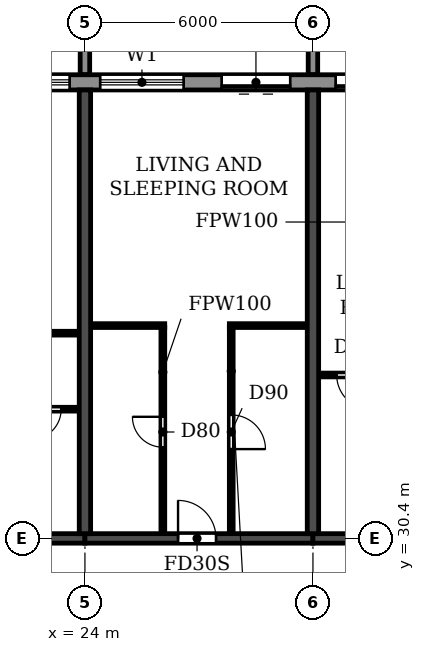
"""IFC4 building model, lengths in metres.
Left out: names, types, materials, properties, quantities, classifications, styles, units other than length and angle.
Written with IfcOpenShell. Run it as: python <this file> out.ifc"""

import sys

from ifc_helpers import new_model, si_unit, direction, frame, frame_2d, origin, place, context, subcontext, project, spatial, polyline, rectangle, outline, extrude, source, transform, mapped, element, fill, save


model = new_model("IFC4")
c1 = context("Model", 3, precision=1e-05, world=origin(), true_north=direction((0.0, 1.0)))
c2 = subcontext(c1, "Body", "Model", "MODEL_VIEW")
j1 = project(units=[si_unit("LENGTHUNIT", "METRE"), si_unit("PLANEANGLEUNIT", "RADIAN")], contexts=[c1])
p1 = place(None, origin())
s1 = spatial("IfcSite", under=j1, at=p1, CompositionType="ELEMENT")
p2 = place(p1, origin())
s2 = spatial("IfcBuilding", under=s1, at=p2, CompositionType="ELEMENT")
p3 = place(p2, frame((0.0, 0.0, 152.1)))
s3 = spatial("IfcBuildingStorey", under=s2, at=p3, CompositionType="ELEMENT", Elevation=152.1)
for number, where, z_axis, x_axis in (
    (1, (24.0, 30.525, 0.0), (0.0, 0.0, 1.0), (0.0, 1.0, 0.0)),
    (2, (30.0, 30.525, 0.0), (0.0, 0.0, 1.0), (0.0, 1.0, 0.0)),
):
    element("IfcWall", number, at=place(p3, frame(where, z_axis=z_axis, x_axis=x_axis)), inside=s3, PredefinedType="SHEAR", context=c2, shape_type="SweptSolid", body=[
        extrude(rectangle(XDim=11.675, YDim=0.3, at=frame_2d((5.837, 0.0))), origin(), (0.0, 0.0, 1.0), 3.07),
    ])
p4 = place(p3, frame((18.0, 30.4, 0.0), z_axis=(0.0, 0.0, 1.0), x_axis=(1.0, 0.0, 0.0)))
e3 = element("IfcWall", 3, at=p4, inside=s3, PredefinedType="SHEAR", context=c2, shape_type="SweptSolid", body=[
    extrude(rectangle(XDim=6.0, YDim=0.25, at=frame_2d((3.0, 0.0))), origin(), (0.0, 0.0, 1.0), 2.47),
])
p5 = place(p4, frame((2.55, 0.0, 0.0)))
e4 = element("IfcOpeningElement", 4, at=p5, cuts=e3, PredefinedType="OPENING", context=c2, shape_type="SweptSolid", body=[
    extrude(rectangle(XDim=1.0, YDim=2.1, at=frame_2d((0.5, 1.05))), frame((0.0, 0.135, 0.0), z_axis=(0.0, -1.0, 0.0), x_axis=(1.0, 0.0, 0.0)), (0.0, 0.0, 1.0), 0.27),
])
p6 = place(p3, frame((24.0, 30.4, 0.0), z_axis=(0.0, 0.0, 1.0), x_axis=(1.0, 0.0, 0.0)))
e5 = element("IfcWall", 5, at=p6, inside=s3, PredefinedType="SHEAR", context=c2, shape_type="SweptSolid", body=[
    extrude(rectangle(XDim=6.0, YDim=0.25, at=frame_2d((3.0, 0.0))), origin(), (0.0, 0.0, 1.0), 2.47),
])
p7 = place(p6, frame((2.45, 0.0, 0.0)))
e6 = element("IfcOpeningElement", 6, at=p7, cuts=e5, PredefinedType="OPENING", context=c2, shape_type="SweptSolid", body=[
    extrude(rectangle(XDim=1.0, YDim=2.1, at=frame_2d((0.5, 1.05))), frame((0.0, 0.135, 0.0), z_axis=(0.0, -1.0, 0.0), x_axis=(1.0, 0.0, 0.0)), (0.0, 0.0, 1.0), 0.27),
])
p8 = place(p3, frame((30.0, 30.4, 0.0), z_axis=(0.0, 0.0, 1.0), x_axis=(1.0, 0.0, 0.0)))
e7 = element("IfcWall", 7, at=p8, inside=s3, PredefinedType="SHEAR", context=c2, shape_type="SweptSolid", body=[
    extrude(rectangle(XDim=6.0, YDim=0.25, at=frame_2d((3.0, 0.0))), origin(), (0.0, 0.0, 1.0), 2.47),
])
p9 = place(p8, frame((2.55, 0.0, 0.0)))
e8 = element("IfcOpeningElement", 8, at=p9, cuts=e7, PredefinedType="OPENING", context=c2, shape_type="SweptSolid", body=[
    extrude(rectangle(XDim=1.0, YDim=2.1, at=frame_2d((0.5, 1.05))), frame((0.0, 0.135, 0.0), z_axis=(0.0, -1.0, 0.0), x_axis=(1.0, 0.0, 0.0)), (0.0, 0.0, 1.0), 0.27),
])
p10 = place(p3, frame((85.317, 42.4, 0.0), z_axis=(0.0, 0.0, 1.0), x_axis=(-1.0, 0.0, 0.0)))
e9 = element("IfcWall", 9, at=p10, inside=s3, PredefinedType="STANDARD", context=c2, shape_type="SweptSolid", body=[
    extrude(rectangle(XDim=68.634, YDim=0.4, at=frame_2d((34.317, 0.0))), origin(), (0.0, 0.0, 1.0), 3.07),
])
p11 = place(p10, frame((64.917, 0.0, 0.0)))
e10 = element("IfcOpeningElement", 10, at=p11, cuts=e9, PredefinedType="OPENING", context=c2, shape_type="SweptSolid", body=[
    extrude(rectangle(XDim=1.8, YDim=2.4, at=frame_2d((0.9, 1.2))), frame((0.0, 0.21, 0.0), z_axis=(0.0, -1.0, 0.0), x_axis=(1.0, 0.0, 0.0)), (0.0, 0.0, 1.0), 0.42),
])
p12 = place(p10, frame((61.717, 0.0, 0.9)))
e11 = element("IfcOpeningElement", 11, at=p12, cuts=e9, PredefinedType="OPENING", context=c2, shape_type="SweptSolid", body=[
    extrude(rectangle(XDim=2.2, YDim=1.5, at=frame_2d((1.1, 0.75))), frame((0.0, 0.21, 0.0), z_axis=(0.0, -1.0, 0.0), x_axis=(1.0, 0.0, 0.0)), (0.0, 0.0, 1.0), 0.42),
])
p13 = place(p10, frame((58.717, 0.0, 0.9)))
e12 = element("IfcOpeningElement", 12, at=p13, cuts=e9, PredefinedType="OPENING", context=c2, shape_type="SweptSolid", body=[
    extrude(rectangle(XDim=2.2, YDim=1.5, at=frame_2d((1.1, 0.75))), frame((0.0, 0.21, 0.0), z_axis=(0.0, -1.0, 0.0), x_axis=(1.0, 0.0, 0.0)), (0.0, 0.0, 1.0), 0.42),
])
p14 = place(p10, frame((55.917, 0.0, 0.0)))
e13 = element("IfcOpeningElement", 13, at=p14, cuts=e9, PredefinedType="OPENING", context=c2, shape_type="SweptSolid", body=[
    extrude(rectangle(XDim=1.8, YDim=2.4, at=frame_2d((0.9, 1.2))), frame((0.0, 0.21, 0.0), z_axis=(0.0, -1.0, 0.0), x_axis=(1.0, 0.0, 0.0)), (0.0, 0.0, 1.0), 0.42),
])
p15 = place(p10, frame((52.917, 0.0, 0.0)))
e14 = element("IfcOpeningElement", 14, at=p15, cuts=e9, PredefinedType="OPENING", context=c2, shape_type="SweptSolid", body=[
    extrude(rectangle(XDim=1.8, YDim=2.4, at=frame_2d((0.9, 1.2))), frame((0.0, 0.21, 0.0), z_axis=(0.0, -1.0, 0.0), x_axis=(1.0, 0.0, 0.0)), (0.0, 0.0, 1.0), 0.42),
])
p16 = place(p10, frame((49.717, 0.0, 0.9)))
e15 = element("IfcOpeningElement", 15, at=p16, cuts=e9, PredefinedType="OPENING", context=c2, shape_type="SweptSolid", body=[
    extrude(rectangle(XDim=2.2, YDim=1.5, at=frame_2d((1.1, 0.75))), frame((0.0, 0.21, 0.0), z_axis=(0.0, -1.0, 0.0), x_axis=(1.0, 0.0, 0.0)), (0.0, 0.0, 1.0), 0.42),
])
p17 = place(p10, frame((46.717, 0.0, 0.9)))
e16 = element("IfcOpeningElement", 16, at=p17, cuts=e9, PredefinedType="OPENING", context=c2, shape_type="SweptSolid", body=[
    extrude(rectangle(XDim=2.2, YDim=1.5, at=frame_2d((1.1, 0.75))), frame((0.0, 0.21, 0.0), z_axis=(0.0, -1.0, 0.0), x_axis=(1.0, 0.0, 0.0)), (0.0, 0.0, 1.0), 0.42),
])
p18 = place(p10, frame((43.717, 0.0, 0.9)))
e17 = element("IfcOpeningElement", 17, at=p18, cuts=e9, PredefinedType="OPENING", context=c2, shape_type="SweptSolid", body=[
    extrude(rectangle(XDim=2.2, YDim=1.5, at=frame_2d((1.1, 0.75))), frame((0.0, 0.21, 0.0), z_axis=(0.0, -1.0, 0.0), x_axis=(1.0, 0.0, 0.0)), (0.0, 0.0, 1.0), 0.42),
])
p19 = place(p10, frame((40.917, 0.0, 0.0)))
e18 = element("IfcOpeningElement", 18, at=p19, cuts=e9, PredefinedType="OPENING", context=c2, shape_type="SweptSolid", body=[
    extrude(rectangle(XDim=1.8, YDim=2.4, at=frame_2d((0.9, 1.2))), frame((0.0, 0.21, 0.0), z_axis=(0.0, -1.0, 0.0), x_axis=(1.0, 0.0, 0.0)), (0.0, 0.0, 1.0), 0.42),
])
p20 = place(p10, frame((37.717, 0.0, 0.9)))
e19 = element("IfcOpeningElement", 19, at=p20, cuts=e9, PredefinedType="OPENING", context=c2, shape_type="SweptSolid", body=[
    extrude(rectangle(XDim=2.2, YDim=1.5, at=frame_2d((1.1, 0.75))), frame((0.0, 0.21, 0.0), z_axis=(0.0, -1.0, 0.0), x_axis=(1.0, 0.0, 0.0)), (0.0, 0.0, 1.0), 0.42),
])
p21 = place(p10, frame((34.917, 0.0, 0.0)))
e20 = element("IfcOpeningElement", 20, at=p21, cuts=e9, PredefinedType="OPENING", context=c2, shape_type="SweptSolid", body=[
    extrude(rectangle(XDim=1.8, YDim=2.4, at=frame_2d((0.9, 1.2))), frame((0.0, 0.21, 0.0), z_axis=(0.0, -1.0, 0.0), x_axis=(1.0, 0.0, 0.0)), (0.0, 0.0, 1.0), 0.42),
])
p22 = place(p10, frame((31.717, 0.0, 0.9)))
e21 = element("IfcOpeningElement", 21, at=p22, cuts=e9, PredefinedType="OPENING", context=c2, shape_type="SweptSolid", body=[
    extrude(rectangle(XDim=2.2, YDim=1.5, at=frame_2d((1.1, 0.75))), frame((0.0, 0.21, 0.0), z_axis=(0.0, -1.0, 0.0), x_axis=(1.0, 0.0, 0.0)), (0.0, 0.0, 1.0), 0.42),
])
p23 = place(p10, frame((28.717, 0.0, 0.9)))
e22 = element("IfcOpeningElement", 22, at=p23, cuts=e9, PredefinedType="OPENING", context=c2, shape_type="SweptSolid", body=[
    extrude(rectangle(XDim=2.2, YDim=1.5, at=frame_2d((1.1, 0.75))), frame((0.0, 0.21, 0.0), z_axis=(0.0, -1.0, 0.0), x_axis=(1.0, 0.0, 0.0)), (0.0, 0.0, 1.0), 0.42),
])
p24 = place(p10, frame((25.717, 0.0, 0.9)))
e23 = element("IfcOpeningElement", 23, at=p24, cuts=e9, PredefinedType="OPENING", context=c2, shape_type="SweptSolid", body=[
    extrude(rectangle(XDim=2.2, YDim=1.5, at=frame_2d((1.1, 0.75))), frame((0.0, 0.21, 0.0), z_axis=(0.0, -1.0, 0.0), x_axis=(1.0, 0.0, 0.0)), (0.0, 0.0, 1.0), 0.42),
])
p25 = place(p10, frame((22.717, 0.0, 0.9)))
e24 = element("IfcOpeningElement", 24, at=p25, cuts=e9, PredefinedType="OPENING", context=c2, shape_type="SweptSolid", body=[
    extrude(rectangle(XDim=2.2, YDim=1.5, at=frame_2d((1.1, 0.75))), frame((0.0, 0.21, 0.0), z_axis=(0.0, -1.0, 0.0), x_axis=(1.0, 0.0, 0.0)), (0.0, 0.0, 1.0), 0.42),
])
p26 = place(p10, frame((19.917, 0.0, 0.0)))
e25 = element("IfcOpeningElement", 25, at=p26, cuts=e9, PredefinedType="OPENING", context=c2, shape_type="SweptSolid", body=[
    extrude(rectangle(XDim=1.8, YDim=2.4, at=frame_2d((0.9, 1.2))), frame((0.0, 0.21, 0.0), z_axis=(0.0, -1.0, 0.0), x_axis=(1.0, 0.0, 0.0)), (0.0, 0.0, 1.0), 0.42),
])
p27 = place(p10, frame((16.717, 0.0, 0.9)))
e26 = element("IfcOpeningElement", 26, at=p27, cuts=e9, PredefinedType="OPENING", context=c2, shape_type="SweptSolid", body=[
    extrude(rectangle(XDim=2.2, YDim=1.5, at=frame_2d((1.1, 0.75))), frame((0.0, 0.21, 0.0), z_axis=(0.0, -1.0, 0.0), x_axis=(1.0, 0.0, 0.0)), (0.0, 0.0, 1.0), 0.42),
])
p28 = place(p10, frame((13.717, 0.0, 0.9)))
e27 = element("IfcOpeningElement", 27, at=p28, cuts=e9, PredefinedType="OPENING", context=c2, shape_type="SweptSolid", body=[
    extrude(rectangle(XDim=2.2, YDim=1.5, at=frame_2d((1.1, 0.75))), frame((0.0, 0.21, 0.0), z_axis=(0.0, -1.0, 0.0), x_axis=(1.0, 0.0, 0.0)), (0.0, 0.0, 1.0), 0.42),
])
p29 = place(p10, frame((10.917, 0.0, 0.0)))
e28 = element("IfcOpeningElement", 28, at=p29, cuts=e9, PredefinedType="OPENING", context=c2, shape_type="SweptSolid", body=[
    extrude(rectangle(XDim=1.8, YDim=2.4, at=frame_2d((0.9, 1.2))), frame((0.0, 0.21, 0.0), z_axis=(0.0, -1.0, 0.0), x_axis=(1.0, 0.0, 0.0)), (0.0, 0.0, 1.0), 0.42),
])
p30 = place(p10, frame((7.717, 0.0, 0.9)))
e29 = element("IfcOpeningElement", 29, at=p30, cuts=e9, PredefinedType="OPENING", context=c2, shape_type="SweptSolid", body=[
    extrude(rectangle(XDim=2.2, YDim=1.5, at=frame_2d((1.1, 0.75))), frame((0.0, 0.21, 0.0), z_axis=(0.0, -1.0, 0.0), x_axis=(1.0, 0.0, 0.0)), (0.0, 0.0, 1.0), 0.42),
])
p31 = place(p10, frame((4.717, 0.0, 0.9)))
e30 = element("IfcOpeningElement", 30, at=p31, cuts=e9, PredefinedType="OPENING", context=c2, shape_type="SweptSolid", body=[
    extrude(rectangle(XDim=2.2, YDim=1.5, at=frame_2d((1.1, 0.75))), frame((0.0, 0.21, 0.0), z_axis=(0.0, -1.0, 0.0), x_axis=(1.0, 0.0, 0.0)), (0.0, 0.0, 1.0), 0.42),
])
p32 = place(p10, frame((1.917, 0.0, 0.0)))
e31 = element("IfcOpeningElement", 31, at=p32, cuts=e9, PredefinedType="OPENING", context=c2, shape_type="SweptSolid", body=[
    extrude(rectangle(XDim=1.8, YDim=2.4, at=frame_2d((0.9, 1.2))), frame((0.0, 0.21, 0.0), z_axis=(0.0, -1.0, 0.0), x_axis=(1.0, 0.0, 0.0)), (0.0, 0.0, 1.0), 0.42),
])
m1 = source(origin(), c2, "Body", "SweptSolid", [
    extrude(outline(polyline([(0.0, 0.0), (0.25, 0.0), (0.25, 3.1), (0.0, 3.1), (0.0, 0.0)])), origin(), (0.0, 0.0, 1.0), 3.1),
])
for number, where in (
    (32, (23.875, 42.6, 0.0)),
    (33, (29.875, 42.6, 0.0)),
):
    element("IfcWall", number, at=place(p3, frame(where)), inside=s3, PredefinedType="STANDARD", context=c2, shape_type="MappedRepresentation", body=[
        mapped(m1, transform((0.0, 0.0, 0.0))),
    ])
p33 = place(p3, frame((21.9, 33.8, 0.0), z_axis=(0.0, 0.0, 1.0), x_axis=(1.0, 0.0, 0.0)))
e34 = element("IfcWall", 34, at=p33, inside=s3, PredefinedType="PARTITIONING", context=c2, shape_type="SweptSolid", body=[
    extrude(rectangle(XDim=1.94, YDim=0.1, at=frame_2d((0.97, 0.0))), origin(), (0.0, 0.0, 1.0), 3.07),
])
p34 = place(p33, frame((0.675, 0.0, 0.0)))
e35 = element("IfcOpeningElement", 35, at=p34, cuts=e34, PredefinedType="OPENING", context=c2, shape_type="SweptSolid", body=[
    extrude(rectangle(XDim=0.8, YDim=2.1, at=frame_2d((0.4, 1.05))), frame((0.0, 0.06, 0.0), z_axis=(0.0, -1.0, 0.0), x_axis=(1.0, 0.0, 0.0)), (0.0, 0.0, 1.0), 0.12),
])
p35 = place(p3, frame((30.16, 34.7, 0.0), z_axis=(0.0, 0.0, 1.0), x_axis=(1.0, 0.0, 0.0)))
e36 = element("IfcWall", 36, at=p35, inside=s3, PredefinedType="PARTITIONING", context=c2, shape_type="SweptSolid", body=[
    extrude(rectangle(XDim=2.04, YDim=0.1, at=frame_2d((1.02, 0.0))), origin(), (0.0, 0.0, 1.0), 3.07),
])
p36 = place(p35, frame((0.465, 0.0, 0.0)))
e37 = element("IfcOpeningElement", 37, at=p36, cuts=e36, PredefinedType="OPENING", context=c2, shape_type="SweptSolid", body=[
    extrude(rectangle(XDim=0.9, YDim=2.1, at=frame_2d((0.45, 1.05))), frame((0.0, 0.06, 0.0), z_axis=(0.0, -1.0, 0.0), x_axis=(1.0, 0.0, 0.0)), (0.0, 0.0, 1.0), 0.12),
])
p37 = place(p3, frame((20.95, 35.8, 0.0), z_axis=(0.0, 0.0, 1.0), x_axis=(1.0, 0.0, 0.0)))
e38 = element("IfcWall", 38, at=p37, inside=s3, PredefinedType="PARTITIONING", context=c2, shape_type="SweptSolid", body=[
    extrude(rectangle(XDim=2.89, YDim=0.1, at=frame_2d((1.445, 0.0))), origin(), (0.0, 0.0, 1.0), 3.07),
])
p38 = place(p37, frame((0.55, 0.0, 0.0)))
e39 = element("IfcOpeningElement", 39, at=p38, cuts=e38, PredefinedType="OPENING", context=c2, shape_type="SweptSolid", body=[
    extrude(rectangle(XDim=0.9, YDim=2.1, at=frame_2d((0.45, 1.05))), frame((0.0, 0.06, 0.0), z_axis=(0.0, -1.0, 0.0), x_axis=(1.0, 0.0, 0.0)), (0.0, 0.0, 1.0), 0.12),
])
p39 = place(p3, frame((24.16, 36.0, 0.0), z_axis=(0.0, 0.0, 1.0), x_axis=(1.0, 0.0, 0.0)))
e40 = element("IfcWall", 40, at=p39, inside=s3, PredefinedType="PARTITIONING", context=c2, shape_type="SweptSolid", body=[
    extrude(rectangle(XDim=1.94, YDim=0.1, at=frame_2d((0.97, 0.0))), origin(), (0.0, 0.0, 1.0), 3.07),
])
p40 = place(p3, frame((27.8, 36.0, 0.0), z_axis=(0.0, 0.0, 1.0), x_axis=(1.0, 0.0, 0.0)))
e41 = element("IfcWall", 41, at=p40, inside=s3, PredefinedType="PARTITIONING", context=c2, shape_type="SweptSolid", body=[
    extrude(rectangle(XDim=2.04, YDim=0.1, at=frame_2d((1.02, 0.0))), origin(), (0.0, 0.0, 1.0), 3.07),
])
p41 = place(p3, frame((26.05, 30.535, 0.0), z_axis=(0.0, 0.0, 1.0), x_axis=(0.0, 1.0, 0.0)))
e42 = element("IfcWall", 42, at=p41, inside=s3, PredefinedType="PARTITIONING", context=c2, shape_type="SweptSolid", body=[
    extrude(rectangle(XDim=5.415, YDim=0.1, at=frame_2d((2.708, 0.0))), origin(), (0.0, 0.0, 1.0), 3.07),
])
p42 = place(p41, frame((2.265, 0.0, 0.0)))
e43 = element("IfcOpeningElement", 43, at=p42, cuts=e42, PredefinedType="OPENING", context=c2, shape_type="SweptSolid", body=[
    extrude(rectangle(XDim=0.8, YDim=2.1, at=frame_2d((0.4, 1.05))), frame((0.0, 0.06, 0.0), z_axis=(0.0, -1.0, 0.0), x_axis=(1.0, 0.0, 0.0)), (0.0, 0.0, 1.0), 0.12),
])
p43 = place(p3, frame((27.85, 30.535, 0.0), z_axis=(0.0, 0.0, 1.0), x_axis=(0.0, 1.0, 0.0)))
e44 = element("IfcWall", 44, at=p43, inside=s3, PredefinedType="PARTITIONING", context=c2, shape_type="SweptSolid", body=[
    extrude(rectangle(XDim=5.415, YDim=0.1, at=frame_2d((2.708, 0.0))), origin(), (0.0, 0.0, 1.0), 3.07),
])
p44 = place(p43, frame((2.215, 0.0, 0.0)))
e45 = element("IfcOpeningElement", 45, at=p44, cuts=e44, PredefinedType="OPENING", context=c2, shape_type="SweptSolid", body=[
    extrude(rectangle(XDim=0.9, YDim=2.1, at=frame_2d((0.45, 1.05))), frame((0.0, 0.06, 0.0), z_axis=(0.0, -1.0, 0.0), x_axis=(1.0, 0.0, 0.0)), (0.0, 0.0, 1.0), 0.12),
])
p45 = place(p12, origin())
e46 = element("IfcWindow", 46, at=p45, inside=s3, PartitioningType="DOUBLE_PANEL_HORIZONTAL", PredefinedType="WINDOW", context=c2, shape_type="SweptSolid", body=[
    extrude(rectangle(XDim=2.2, YDim=1.5, at=frame_2d((1.1, 0.75))), frame((0.0, 0.03, 0.0), z_axis=(0.0, -1.0, 0.0), x_axis=(1.0, 0.0, 0.0)), (0.0, 0.0, 1.0), 0.06),
])
fill(e11, e46)
p46 = place(p13, origin())
e47 = element("IfcWindow", 47, at=p46, inside=s3, PartitioningType="DOUBLE_PANEL_HORIZONTAL", PredefinedType="WINDOW", context=c2, shape_type="SweptSolid", body=[
    extrude(rectangle(XDim=2.2, YDim=1.5, at=frame_2d((1.1, 0.75))), frame((0.0, 0.03, 0.0), z_axis=(0.0, -1.0, 0.0), x_axis=(1.0, 0.0, 0.0)), (0.0, 0.0, 1.0), 0.06),
])
fill(e12, e47)
p47 = place(p14, origin())
e48 = element("IfcDoor", 48, at=p47, inside=s3, OperationType="DOUBLE_DOOR_SLIDING", PredefinedType="DOOR", context=c2, shape_type="SweptSolid", body=[
    extrude(rectangle(XDim=1.8, YDim=2.4, at=frame_2d((0.9, 1.2))), frame((0.0, 0.025, 0.0), z_axis=(0.0, -1.0, 0.0), x_axis=(1.0, 0.0, 0.0)), (0.0, 0.0, 1.0), 0.05),
])
fill(e13, e48)
p48 = place(p15, origin())
e49 = element("IfcDoor", 49, at=p48, inside=s3, OperationType="DOUBLE_DOOR_SLIDING", PredefinedType="DOOR", context=c2, shape_type="SweptSolid", body=[
    extrude(rectangle(XDim=1.8, YDim=2.4, at=frame_2d((0.9, 1.2))), frame((0.0, 0.025, 0.0), z_axis=(0.0, -1.0, 0.0), x_axis=(1.0, 0.0, 0.0)), (0.0, 0.0, 1.0), 0.05),
])
fill(e14, e49)
p49 = place(p34, frame((0.8, 0.0, 0.0), z_axis=(0.0, 0.0, 1.0), x_axis=(-1.0, 0.0, 0.0)))
e50 = element("IfcDoor", 50, at=p49, inside=s3, OperationType="SINGLE_SWING_RIGHT", PredefinedType="DOOR", context=c2, shape_type="SweptSolid", body=[
    extrude(rectangle(XDim=0.8, YDim=2.1, at=frame_2d((0.4, 1.05))), frame((0.0, 0.025, 0.0), z_axis=(0.0, -1.0, 0.0), x_axis=(1.0, 0.0, 0.0)), (0.0, 0.0, 1.0), 0.05),
])
fill(e35, e50)
p50 = place(p42, origin())
e51 = element("IfcDoor", 51, at=p50, inside=s3, OperationType="SINGLE_SWING_RIGHT", PredefinedType="DOOR", context=c2, shape_type="SweptSolid", body=[
    extrude(rectangle(XDim=0.8, YDim=2.1, at=frame_2d((0.4, 1.05))), frame((0.0, 0.025, 0.0), z_axis=(0.0, -1.0, 0.0), x_axis=(1.0, 0.0, 0.0)), (0.0, 0.0, 1.0), 0.05),
])
fill(e43, e51)
p51 = place(p7, origin())
e52 = element("IfcDoor", 52, at=p51, inside=s3, OperationType="SINGLE_SWING_LEFT", PredefinedType="DOOR", context=c2, shape_type="SweptSolid", body=[
    extrude(rectangle(XDim=1.0, YDim=2.1, at=frame_2d((0.5, 1.05))), frame((0.0, 0.025, 0.0), z_axis=(0.0, -1.0, 0.0), x_axis=(1.0, 0.0, 0.0)), (0.0, 0.0, 1.0), 0.05),
])
fill(e6, e52)
p52 = place(p44, frame((0.9, 0.0, 0.0), z_axis=(0.0, 0.0, 1.0), x_axis=(-1.0, 0.0, 0.0)))
e53 = element("IfcDoor", 53, at=p52, inside=s3, OperationType="SINGLE_SWING_RIGHT", PredefinedType="DOOR", context=c2, shape_type="SweptSolid", body=[
    extrude(rectangle(XDim=0.9, YDim=2.1, at=frame_2d((0.45, 1.05))), frame((0.0, 0.025, 0.0), z_axis=(0.0, -1.0, 0.0), x_axis=(1.0, 0.0, 0.0)), (0.0, 0.0, 1.0), 0.05),
])
fill(e45, e53)
p53 = place(p36, frame((0.9, 0.0, 0.0), z_axis=(0.0, 0.0, 1.0), x_axis=(-1.0, 0.0, 0.0)))
e54 = element("IfcDoor", 54, at=p53, inside=s3, OperationType="SINGLE_SWING_LEFT", PredefinedType="DOOR", context=c2, shape_type="SweptSolid", body=[
    extrude(rectangle(XDim=0.9, YDim=2.1, at=frame_2d((0.45, 1.05))), frame((0.0, 0.025, 0.0), z_axis=(0.0, -1.0, 0.0), x_axis=(1.0, 0.0, 0.0)), (0.0, 0.0, 1.0), 0.05),
])
fill(e37, e54)
save(model, sys.argv[1])
